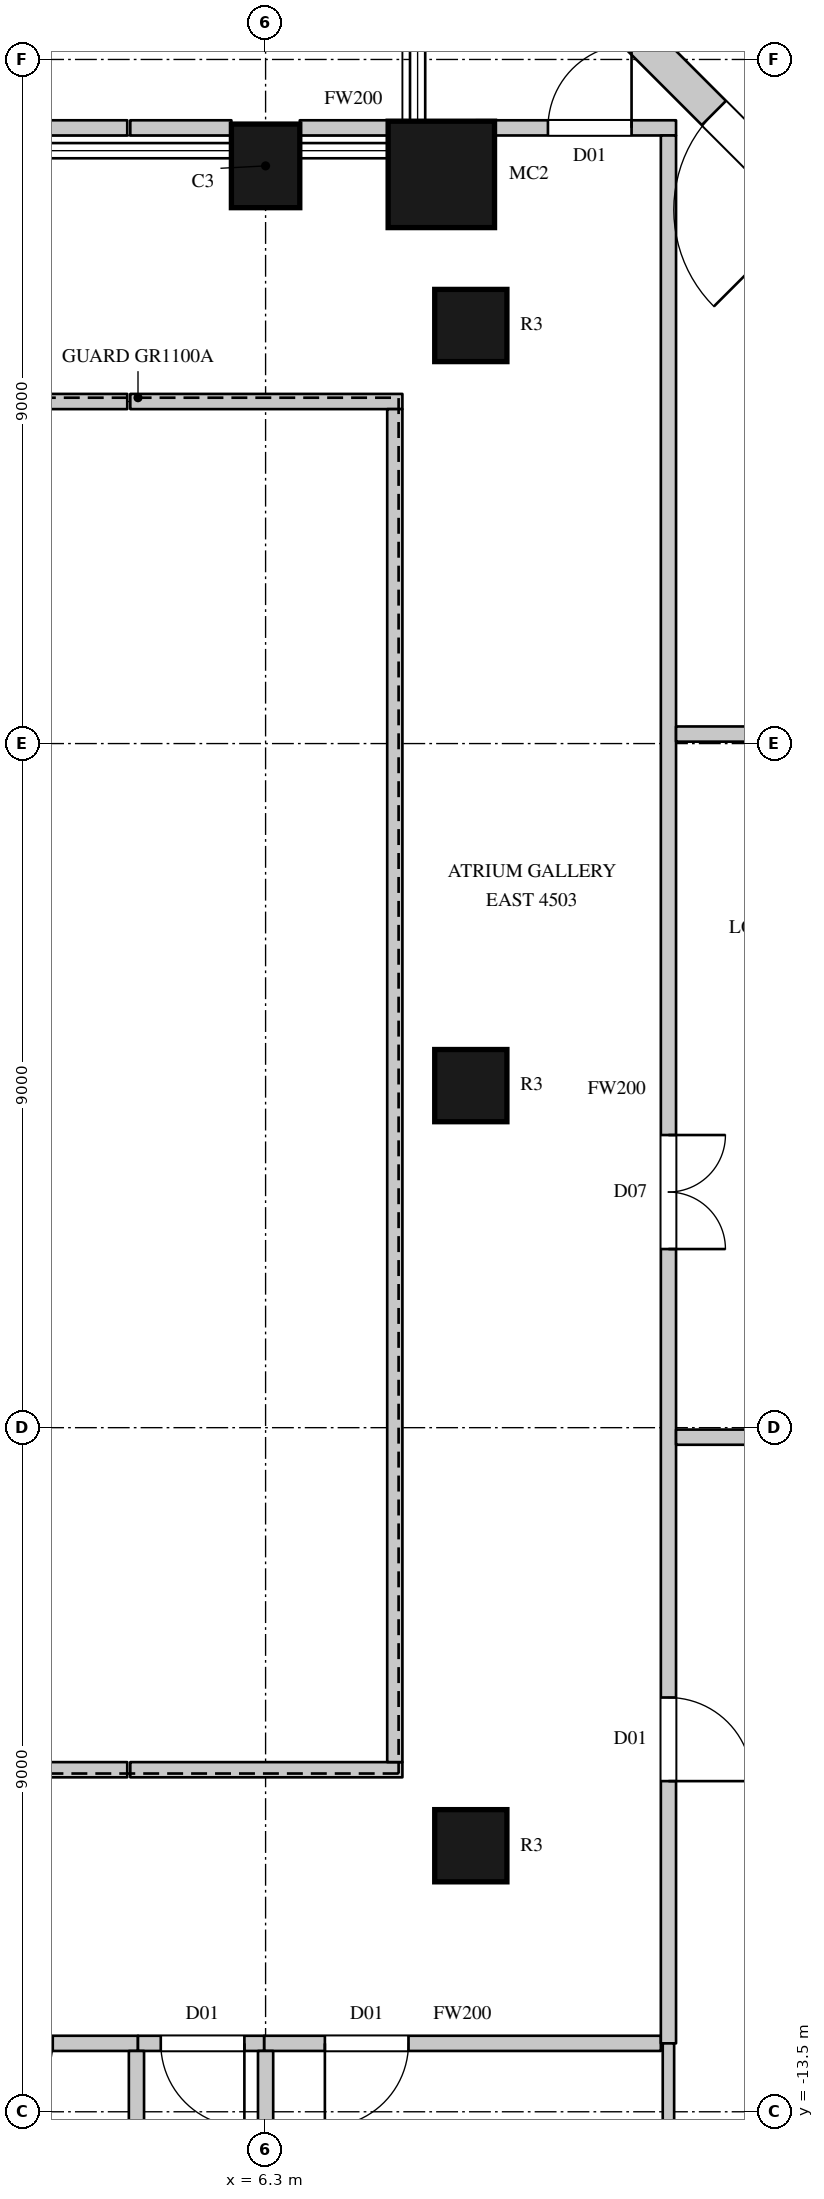
"""IFC4 building model, lengths in metres.
Left out: names, types, materials, properties, quantities, classifications, styles, units other than length and angle.
Written with IfcOpenShell. Run it as: python <this file> out.ifc"""

import sys

from ifc_helpers import new_model, si_unit, direction, frame, frame_2d, origin, origin_2d, place, context, subcontext, project, spatial, rectangle, circle, extrude, element, fill, save


model = new_model("IFC4")
c1 = context("Model", 3, precision=1e-05, world=origin(), true_north=direction((0.0, 1.0)))
c2 = subcontext(c1, "Body", "Model", "MODEL_VIEW")
j1 = project(units=[si_unit("LENGTHUNIT", "METRE"), si_unit("PLANEANGLEUNIT", "RADIAN")], contexts=[c1])
p1 = place(None, origin())
s1 = spatial("IfcSite", under=j1, at=p1, CompositionType="ELEMENT")
p2 = place(p1, origin())
s2 = spatial("IfcBuilding", under=s1, at=p2, CompositionType="ELEMENT")
p3 = place(p2, frame((0.0, 0.0, 205.6)))
s3 = spatial("IfcBuildingStorey", under=s2, at=p3, CompositionType="ELEMENT", Elevation=205.6)
p4 = place(p3, frame((8.612, 11.988, 0.0), z_axis=(0.0, 0.0, 1.0), x_axis=(1.0, 0.0, 0.0)))
e1 = element("IfcColumn", 1, at=p4, inside=s3, PredefinedType="COLUMN", context=c2, shape_type="SweptSolid", body=[
    extrude(circle(Radius=0.7, at=origin_2d()), origin(), (0.0, 0.0, 1.0), 4.1),
])
p5 = place(p3, frame((6.3, 12.1, 0.0), z_axis=(0.0, 0.0, 1.0), x_axis=(-1.0, 0.0, 0.0)))
e2 = element("IfcColumn", 2, at=p5, inside=s3, PredefinedType="COLUMN", context=c2, shape_type="SweptSolid", body=[
    extrude(rectangle(XDim=0.9, YDim=1.1, at=origin_2d()), origin(), (0.0, 0.0, 1.0), 4.1),
])
for number, where, z_axis, x_axis in (
    (3, (9.0, -10.0, 0.0), (0.0, 0.0, 1.0), (1.0, 0.0, 0.0)),
    (4, (9.0, 0.0, 0.0), (0.0, 0.0, 1.0), (1.0, 0.0, 0.0)),
    (5, (9.0, 10.0, 0.0), (0.0, 0.0, 1.0), (1.0, 0.0, 0.0)),
):
    element("IfcColumn", number, at=place(p3, frame(where, z_axis=z_axis, x_axis=x_axis)), inside=s3, PredefinedType="COLUMN", context=c2, shape_type="SweptSolid", body=[
        extrude(circle(Radius=0.475, at=origin_2d()), origin(), (0.0, 0.0, 1.0), 4.1),
    ])
p6 = place(p3, frame((13.941, 11.053, 0.0), z_axis=(0.0, 0.0, 1.0), x_axis=(-0.707106781187, 0.707106781187, 0.0)))
e6 = element("IfcWall", 6, at=p6, inside=s3, PredefinedType="SOLIDWALL", context=c2, shape_type="SweptSolid", body=[
    extrude(rectangle(XDim=6.505, YDim=0.45, at=frame_2d((3.252, 0.0))), origin(), (0.0, 0.0, 1.0), 3.8),
])
p7 = place(p6, frame((0.665, 0.0, 0.0)))
e7 = element("IfcOpeningElement", 7, at=p7, cuts=e6, PredefinedType="OPENING", context=c2, shape_type="SweptSolid", body=[
    extrude(rectangle(XDim=1.8, YDim=2.4, at=frame_2d((0.9, 1.2))), frame((0.0, 0.235, 0.0), z_axis=(0.0, -1.0, 0.0), x_axis=(1.0, 0.0, 0.0)), (0.0, 0.0, 1.0), 0.47),
])
p8 = place(p3, frame((-10.9, -12.6, 0.0), z_axis=(0.0, 0.0, 1.0), x_axis=(1.0, 0.0, 0.0)))
e8 = element("IfcWall", 8, at=p8, inside=s3, PredefinedType="PARTITIONING", context=c2, shape_type="SweptSolid", body=[
    extrude(rectangle(XDim=15.521, YDim=0.2, at=frame_2d((7.76, 0.0))), origin(), (0.0, 0.0, 1.0), 3.8),
])
p9 = place(p8, frame((0.95, 0.0, 0.0)))
e9 = element("IfcOpeningElement", 9, at=p9, cuts=e8, PredefinedType="OPENING", context=c2, shape_type="SweptSolid", body=[
    extrude(rectangle(XDim=0.9, YDim=2.2, at=frame_2d((0.45, 1.1))), frame((0.0, 0.11, 0.0), z_axis=(0.0, -1.0, 0.0), x_axis=(1.0, 0.0, 0.0)), (0.0, 0.0, 1.0), 0.22),
])
p10 = place(p8, frame((3.95, 0.0, 0.0)))
e10 = element("IfcOpeningElement", 10, at=p10, cuts=e8, PredefinedType="OPENING", context=c2, shape_type="SweptSolid", body=[
    extrude(rectangle(XDim=0.9, YDim=2.2, at=frame_2d((0.45, 1.1))), frame((0.0, 0.11, 0.0), z_axis=(0.0, -1.0, 0.0), x_axis=(1.0, 0.0, 0.0)), (0.0, 0.0, 1.0), 0.22),
])
p11 = place(p8, frame((7.1, 0.0, 0.0)))
e11 = element("IfcOpeningElement", 11, at=p11, cuts=e8, PredefinedType="OPENING", context=c2, shape_type="SweptSolid", body=[
    extrude(rectangle(XDim=0.9, YDim=2.2, at=frame_2d((0.45, 1.1))), frame((0.0, 0.11, 0.0), z_axis=(0.0, -1.0, 0.0), x_axis=(1.0, 0.0, 0.0)), (0.0, 0.0, 1.0), 0.22),
])
p12 = place(p8, frame((10.0, 0.0, 0.0)))
e12 = element("IfcOpeningElement", 12, at=p12, cuts=e8, PredefinedType="OPENING", context=c2, shape_type="SweptSolid", body=[
    extrude(rectangle(XDim=0.9, YDim=2.2, at=frame_2d((0.45, 1.1))), frame((0.0, 0.11, 0.0), z_axis=(0.0, -1.0, 0.0), x_axis=(1.0, 0.0, 0.0)), (0.0, 0.0, 1.0), 0.22),
])
p13 = place(p8, frame((13.5, 0.0, 0.0)))
e13 = element("IfcOpeningElement", 13, at=p13, cuts=e8, PredefinedType="OPENING", context=c2, shape_type="SweptSolid", body=[
    extrude(rectangle(XDim=0.9, YDim=2.2, at=frame_2d((0.45, 1.1))), frame((0.0, 0.11, 0.0), z_axis=(0.0, -1.0, 0.0), x_axis=(1.0, 0.0, 0.0)), (0.0, 0.0, 1.0), 0.22),
])
p14 = place(p3, frame((-2.25, 12.6, 0.0), z_axis=(0.0, 0.0, 1.0), x_axis=(1.0, 0.0, 0.0)))
e14 = element("IfcWall", 14, at=p14, inside=s3, PredefinedType="PARTITIONING", context=c2, shape_type="SweptSolid", body=[
    extrude(rectangle(XDim=6.73, YDim=0.2, at=frame_2d((3.365, 0.0))), origin(), (0.0, 0.0, 1.0), 3.8),
])
for number, where, z_axis, x_axis in (
    (15, (-6.1, -9.0, 0.0), (0.0, 0.0, 1.0), (1.0, 0.0, 0.0)),
    (16, (-6.1, 9.0, 0.0), (0.0, 0.0, 1.0), (1.0, 0.0, 0.0)),
):
    element("IfcWall", number, at=place(p3, frame(where, z_axis=z_axis, x_axis=x_axis)), inside=s3, PredefinedType="PARTITIONING", context=c2, shape_type="SweptSolid", body=[
        extrude(rectangle(XDim=10.58, YDim=0.2, at=frame_2d((5.29, 0.0))), origin(), (0.0, 0.0, 1.0), 3.8),
    ])
for number, where, z_axis, x_axis in (
    (17, (4.52, -9.0, 0.0), (0.0, 0.0, 1.0), (1.0, 0.0, 0.0)),
    (18, (4.52, 9.0, 0.0), (0.0, 0.0, 1.0), (1.0, 0.0, 0.0)),
):
    element("IfcWall", number, at=place(p3, frame(where, z_axis=z_axis, x_axis=x_axis)), inside=s3, PredefinedType="PARTITIONING", context=c2, shape_type="SweptSolid", body=[
        extrude(rectangle(XDim=3.58, YDim=0.2, at=frame_2d((1.79, 0.0))), origin(), (0.0, 0.0, 1.0), 3.8),
    ])
p15 = place(p3, frame((4.52, 12.6, 0.0), z_axis=(0.0, 0.0, 1.0), x_axis=(1.0, 0.0, 0.0)))
e19 = element("IfcWall", 19, at=p15, inside=s3, PredefinedType="PARTITIONING", context=c2, shape_type="SweptSolid", body=[
    extrude(rectangle(XDim=1.33, YDim=0.2, at=frame_2d((0.665, 0.0))), origin(), (0.0, 0.0, 1.0), 3.8),
])
p16 = place(p3, frame((6.75, 12.6, 0.0), z_axis=(0.0, 0.0, 1.0), x_axis=(1.0, 0.0, 0.0)))
e20 = element("IfcWall", 20, at=p16, inside=s3, PredefinedType="PARTITIONING", context=c2, shape_type="SweptSolid", body=[
    extrude(rectangle(XDim=1.41, YDim=0.2, at=frame_2d((0.705, 0.0))), origin(), (0.0, 0.0, 1.0), 3.8),
])
p17 = place(p3, frame((6.28, -12.6, 0.0), z_axis=(0.0, 0.0, 1.0), x_axis=(1.0, 0.0, 0.0)))
e21 = element("IfcWall", 21, at=p17, inside=s3, PredefinedType="PARTITIONING", context=c2, shape_type="SweptSolid", body=[
    extrude(rectangle(XDim=5.22, YDim=0.2, at=frame_2d((2.61, 0.0))), origin(), (0.0, 0.0, 1.0), 3.8),
])
p18 = place(p17, frame((0.8, 0.0, 0.0)))
e22 = element("IfcOpeningElement", 22, at=p18, cuts=e21, PredefinedType="OPENING", context=c2, shape_type="SweptSolid", body=[
    extrude(rectangle(XDim=1.1, YDim=2.4, at=frame_2d((0.55, 1.2))), frame((0.0, 0.11, 0.0), z_axis=(0.0, -1.0, 0.0), x_axis=(1.0, 0.0, 0.0)), (0.0, 0.0, 1.0), 0.22),
])
p19 = place(p3, frame((8.0, -8.9, 0.0), z_axis=(0.0, 0.0, 1.0), x_axis=(0.0, 1.0, 0.0)))
e23 = element("IfcWall", 23, at=p19, inside=s3, PredefinedType="PARTITIONING", context=c2, shape_type="SweptSolid", body=[
    extrude(rectangle(XDim=17.8, YDim=0.2, at=frame_2d((8.9, 0.0))), origin(), (0.0, 0.0, 1.0), 3.8),
])
p20 = place(p3, frame((9.065, 12.6, 0.0), z_axis=(0.0, 0.0, 1.0), x_axis=(1.0, 0.0, 0.0)))
e24 = element("IfcWall", 24, at=p20, inside=s3, PredefinedType="PARTITIONING", context=c2, shape_type="SweptSolid", body=[
    extrude(rectangle(XDim=2.635, YDim=0.2, at=frame_2d((1.318, 0.0))), origin(), (0.0, 0.0, 1.0), 3.8),
])
p21 = place(p20, frame((0.95, 0.0, 0.0)))
e25 = element("IfcOpeningElement", 25, at=p21, cuts=e24, PredefinedType="OPENING", context=c2, shape_type="SweptSolid", body=[
    extrude(rectangle(XDim=1.1, YDim=2.4, at=frame_2d((0.55, 1.2))), frame((0.0, 0.11, 0.0), z_axis=(0.0, -1.0, 0.0), x_axis=(1.0, 0.0, 0.0)), (0.0, 0.0, 1.0), 0.22),
])
p22 = place(p3, frame((11.6, -12.6, 0.0), z_axis=(0.0, 0.0, 1.0), x_axis=(0.0, 1.0, 0.0)))
e26 = element("IfcWall", 26, at=p22, inside=s3, PredefinedType="PARTITIONING", context=c2, shape_type="SweptSolid", body=[
    extrude(rectangle(XDim=25.1, YDim=0.2, at=frame_2d((12.55, 0.0))), origin(), (0.0, 0.0, 1.0), 3.8),
])
p23 = place(p22, frame((10.45, 0.0, 0.0)))
e27 = element("IfcOpeningElement", 27, at=p23, cuts=e26, PredefinedType="OPENING", context=c2, shape_type="SweptSolid", body=[
    extrude(rectangle(XDim=1.5, YDim=2.4, at=frame_2d((0.75, 1.2))), frame((0.0, 0.11, 0.0), z_axis=(0.0, -1.0, 0.0), x_axis=(1.0, 0.0, 0.0)), (0.0, 0.0, 1.0), 0.22),
])
p24 = place(p22, frame((3.45, 0.0, 0.0)))
e28 = element("IfcOpeningElement", 28, at=p24, cuts=e26, PredefinedType="OPENING", context=c2, shape_type="SweptSolid", body=[
    extrude(rectangle(XDim=1.1, YDim=2.4, at=frame_2d((0.55, 1.2))), frame((0.0, 0.11, 0.0), z_axis=(0.0, -1.0, 0.0), x_axis=(1.0, 0.0, 0.0)), (0.0, 0.0, 1.0), 0.22),
])
for number, where, z_axis, x_axis in (
    (29, (11.7, -4.625, 0.0), (0.0, 0.0, 1.0), (1.0, 0.0, 0.0)),
    (30, (11.7, 4.625, 0.0), (0.0, 0.0, 1.0), (1.0, 0.0, 0.0)),
):
    element("IfcWall", number, at=place(p3, frame(where, z_axis=z_axis, x_axis=x_axis)), inside=s3, PredefinedType="PARTITIONING", context=c2, shape_type="SweptSolid", body=[
        extrude(rectangle(XDim=2.975, YDim=0.2, at=frame_2d((1.488, 0.0))), origin(), (0.0, 0.0, 1.0), 3.8),
    ])
p25 = place(p3, frame((11.6, -16.7, 0.0), z_axis=(0.0, 0.0, 1.0), x_axis=(0.0, 1.0, 0.0)))
e31 = element("IfcWall", 31, at=p25, inside=s3, PredefinedType="PARTITIONING", context=c2, shape_type="SweptSolid", body=[
    extrude(rectangle(XDim=4.1, YDim=0.15, at=frame_2d((2.05, 0.0))), origin(), (0.0, 0.0, 1.0), 3.8),
])
p26 = place(p3, frame((4.621, -12.6, 0.0), z_axis=(0.0, 0.0, 1.0), x_axis=(1.0, 0.0, 0.0)))
e32 = element("IfcWall", 32, at=p26, inside=s3, PredefinedType="PARTITIONING", context=c2, shape_type="SweptSolid", body=[
    extrude(rectangle(XDim=1.659, YDim=0.2, at=frame_2d((0.83, 0.0))), origin(), (0.0, 0.0, 1.0), 3.8),
])
p27 = place(p26, frame((0.3, 0.0, 0.0)))
e33 = element("IfcOpeningElement", 33, at=p27, cuts=e32, PredefinedType="OPENING", context=c2, shape_type="SweptSolid", body=[
    extrude(rectangle(XDim=1.1, YDim=2.4, at=frame_2d((0.55, 1.2))), frame((0.0, 0.11, 0.0), z_axis=(0.0, -1.0, 0.0), x_axis=(1.0, 0.0, 0.0)), (0.0, 0.0, 1.0), 0.22),
])
p28 = place(p3, frame((4.601, -16.7, 0.0), z_axis=(0.0, 0.0, 1.0), x_axis=(0.0, 1.0, 0.0)))
e34 = element("IfcWall", 34, at=p28, inside=s3, PredefinedType="PARTITIONING", context=c2, shape_type="SweptSolid", body=[
    extrude(rectangle(XDim=4.0, YDim=0.2, at=frame_2d((2.0, 0.0))), origin(), (0.0, 0.0, 1.0), 3.8),
])
p29 = place(p3, frame((6.3, -16.05, 0.0), z_axis=(0.0, 0.0, 1.0), x_axis=(0.0, 1.0, 0.0)))
e35 = element("IfcWall", 35, at=p29, inside=s3, PredefinedType="PARTITIONING", context=c2, shape_type="SweptSolid", body=[
    extrude(rectangle(XDim=3.35, YDim=0.2, at=frame_2d((1.675, 0.0))), origin(), (0.0, 0.0, 1.0), 3.25),
])
p30 = place(p7, origin())
e36 = element("IfcDoor", 36, at=p30, inside=s3, OperationType="SLIDING_TO_LEFT", PredefinedType="DOOR", context=c2, shape_type="SweptSolid", body=[
    extrude(rectangle(XDim=1.8, YDim=2.4, at=frame_2d((0.9, 1.2))), frame((0.0, 0.13, 0.0), z_axis=(0.0, -1.0, 0.0), x_axis=(1.0, 0.0, 0.0)), (0.0, 0.0, 1.0), 0.05),
])
fill(e7, e36)
p31 = place(p23, origin())
e37 = element("IfcDoor", 37, at=p31, inside=s3, OperationType="DOUBLE_DOOR_SINGLE_SWING", PredefinedType="DOOR", context=c2, shape_type="SweptSolid", body=[
    extrude(rectangle(XDim=1.5, YDim=2.4, at=frame_2d((0.75, 1.2))), frame((0.0, 0.025, 0.0), z_axis=(0.0, -1.0, 0.0), x_axis=(1.0, 0.0, 0.0)), (0.0, 0.0, 1.0), 0.05),
])
fill(e27, e37)
p32 = place(p27, origin())
e38 = element("IfcDoor", 38, at=p32, inside=s3, OperationType="SINGLE_SWING_LEFT", PredefinedType="DOOR", context=c2, shape_type="SweptSolid", body=[
    extrude(rectangle(XDim=1.1, YDim=2.4, at=frame_2d((0.55, 1.2))), frame((0.0, 0.025, 0.0), z_axis=(0.0, -1.0, 0.0), x_axis=(1.0, 0.0, 0.0)), (0.0, 0.0, 1.0), 0.05),
])
fill(e33, e38)
p33 = place(p18, origin())
e39 = element("IfcDoor", 39, at=p33, inside=s3, OperationType="SINGLE_SWING_RIGHT", PredefinedType="DOOR", context=c2, shape_type="SweptSolid", body=[
    extrude(rectangle(XDim=1.1, YDim=2.4, at=frame_2d((0.55, 1.2))), frame((0.0, 0.025, 0.0), z_axis=(0.0, -1.0, 0.0), x_axis=(1.0, 0.0, 0.0)), (0.0, 0.0, 1.0), 0.05),
])
fill(e22, e39)
p34 = place(p21, origin())
e40 = element("IfcDoor", 40, at=p34, inside=s3, OperationType="SINGLE_SWING_RIGHT", PredefinedType="DOOR", context=c2, shape_type="SweptSolid", body=[
    extrude(rectangle(XDim=1.1, YDim=2.4, at=frame_2d((0.55, 1.2))), frame((0.0, 0.025, 0.0), z_axis=(0.0, -1.0, 0.0), x_axis=(1.0, 0.0, 0.0)), (0.0, 0.0, 1.0), 0.05),
])
fill(e25, e40)
p35 = place(p24, origin())
e41 = element("IfcDoor", 41, at=p35, inside=s3, OperationType="SINGLE_SWING_RIGHT", PredefinedType="DOOR", context=c2, shape_type="SweptSolid", body=[
    extrude(rectangle(XDim=1.1, YDim=2.4, at=frame_2d((0.55, 1.2))), frame((0.0, 0.025, 0.0), z_axis=(0.0, -1.0, 0.0), x_axis=(1.0, 0.0, 0.0)), (0.0, 0.0, 1.0), 0.05),
])
fill(e28, e41)
save(model, sys.argv[1])
